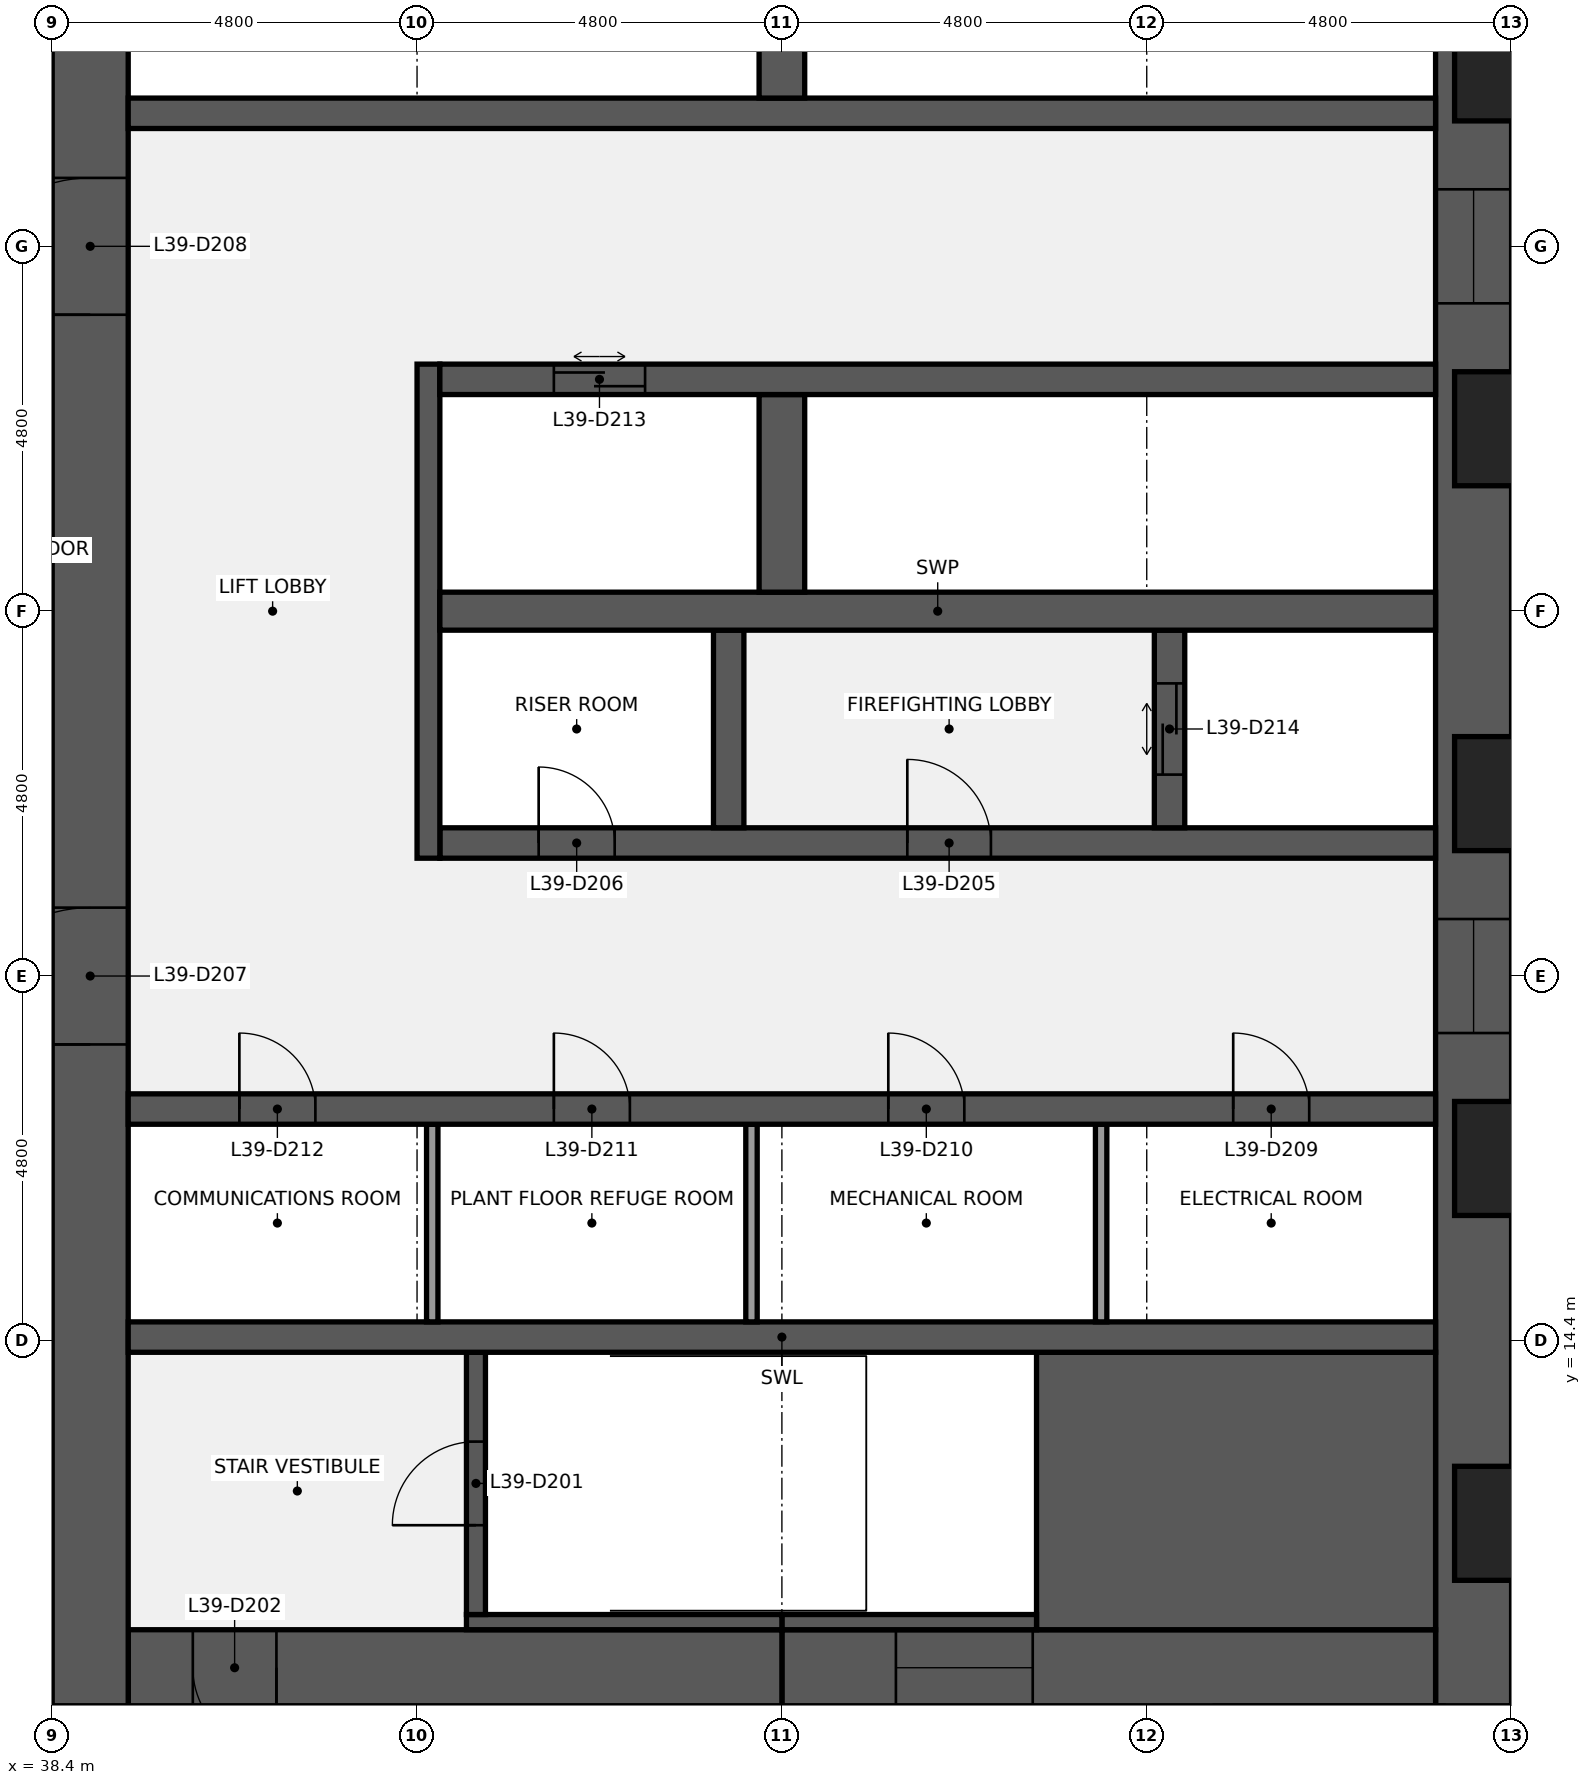
"""IFC4 building model, lengths in metres.
Left out: names, types, materials, properties, quantities, classifications, styles, units other than length and angle.
Written with IfcOpenShell. Run it as: python <this file> out.ifc"""

import sys

from ifc_helpers import new_model, si_unit, direction, frame, frame_2d, origin, place, context, subcontext, project, spatial, rectangle, extrude, element, fill, save


model = new_model("IFC4")
c1 = context("Model", 3, precision=1e-05, world=origin(), true_north=direction((0.0, 1.0)))
c2 = subcontext(c1, "Body", "Model", "MODEL_VIEW")
j1 = project(units=[si_unit("LENGTHUNIT", "METRE"), si_unit("PLANEANGLEUNIT", "RADIAN")], contexts=[c1])
p1 = place(None, origin())
s1 = spatial("IfcSite", under=j1, at=p1, CompositionType="ELEMENT")
p2 = place(p1, origin())
s2 = spatial("IfcBuilding", under=s1, at=p2, CompositionType="ELEMENT")
p3 = place(p2, frame((0.0, 0.0, 176.1)))
s3 = spatial("IfcBuildingStorey", under=s2, at=p3, CompositionType="ELEMENT", Elevation=176.1)
p4 = place(p3, frame((57.1, 38.4, 0.0), z_axis=(0.0, 0.0, 1.0), x_axis=(0.0, -1.0, 0.0)))
e1 = element("IfcWall", 1, at=p4, inside=s3, PredefinedType="SHEAR", context=c2, shape_type="SweptSolid", body=[
    extrude(rectangle(XDim=28.8, YDim=1.0, at=frame_2d((14.4, 0.0))), origin(), (0.0, 0.0, 1.0), 4.1),
])
p5 = place(p4, frame((18.45, 0.0, 0.9)))
e2 = element("IfcOpeningElement", 2, at=p5, cuts=e1, PredefinedType="OPENING", context=c2, shape_type="SweptSolid", body=[
    extrude(rectangle(XDim=1.5, YDim=1.5, at=frame_2d((0.75, 0.75))), frame((0.0, 0.51, 0.0), z_axis=(0.0, -1.0, 0.0), x_axis=(1.0, 0.0, 0.0)), (0.0, 0.0, 1.0), 1.02),
])
p6 = place(p4, frame((8.85, 0.0, 0.9)))
e3 = element("IfcOpeningElement", 3, at=p6, cuts=e1, PredefinedType="OPENING", context=c2, shape_type="SweptSolid", body=[
    extrude(rectangle(XDim=1.5, YDim=1.5, at=frame_2d((0.75, 0.75))), frame((0.0, 0.51, 0.0), z_axis=(0.0, -1.0, 0.0), x_axis=(1.0, 0.0, 0.0)), (0.0, 0.0, 1.0), 1.02),
])
p7 = place(p3, frame((56.6, 10.1, 0.0), z_axis=(0.0, 0.0, 1.0), x_axis=(-1.0, 0.0, 0.0)))
e4 = element("IfcWall", 4, at=p7, inside=s3, PredefinedType="SHEAR", context=c2, shape_type="SweptSolid", body=[
    extrude(rectangle(XDim=8.6, YDim=1.0, at=frame_2d((4.3, 0.0))), origin(), (0.0, 0.0, 1.0), 4.1),
])
p8 = place(p7, frame((5.3, 0.0, 0.9)))
e5 = element("IfcOpeningElement", 5, at=p8, cuts=e4, PredefinedType="OPENING", context=c2, shape_type="SweptSolid", body=[
    extrude(rectangle(XDim=1.8, YDim=1.5, at=frame_2d((0.9, 0.75))), frame((0.0, 0.51, 0.0), z_axis=(0.0, -1.0, 0.0), x_axis=(1.0, 0.0, 0.0)), (0.0, 0.0, 1.0), 1.02),
])
p9 = place(p3, frame((48.0, 10.1, 0.0), z_axis=(0.0, 0.0, 1.0), x_axis=(-1.0, 0.0, 0.0)))
e6 = element("IfcWall", 6, at=p9, inside=s3, PredefinedType="SHEAR", context=c2, shape_type="SweptSolid", body=[
    extrude(rectangle(XDim=8.6, YDim=1.0, at=frame_2d((4.3, 0.0))), origin(), (0.0, 0.0, 1.0), 4.1),
])
p10 = place(p9, frame((6.65, 0.0, 0.0)))
e7 = element("IfcOpeningElement", 7, at=p10, cuts=e6, PredefinedType="OPENING", context=c2, shape_type="SweptSolid", body=[
    extrude(rectangle(XDim=1.1, YDim=2.1, at=frame_2d((0.55, 1.05))), frame((0.0, 0.51, 0.0), z_axis=(0.0, -1.0, 0.0), x_axis=(1.0, 0.0, 0.0)), (0.0, 0.0, 1.0), 1.02),
])
p11 = place(p3, frame((38.9, 9.6, 0.0), z_axis=(0.0, 0.0, 1.0), x_axis=(0.0, 1.0, 0.0)))
e8 = element("IfcWall", 8, at=p11, inside=s3, PredefinedType="SHEAR", context=c2, shape_type="SweptSolid", body=[
    extrude(rectangle(XDim=28.8, YDim=1.0, at=frame_2d((14.4, 0.0))), origin(), (0.0, 0.0, 1.0), 4.1),
])
p12 = place(p11, frame((8.7, 0.0, 0.0)))
e9 = element("IfcOpeningElement", 9, at=p12, cuts=e8, PredefinedType="OPENING", context=c2, shape_type="SweptSolid", body=[
    extrude(rectangle(XDim=1.8, YDim=2.1, at=frame_2d((0.9, 1.05))), frame((0.0, 0.51, 0.0), z_axis=(0.0, -1.0, 0.0), x_axis=(1.0, 0.0, 0.0)), (0.0, 0.0, 1.0), 1.02),
])
p13 = place(p11, frame((18.3, 0.0, 0.0)))
e10 = element("IfcOpeningElement", 10, at=p13, cuts=e8, PredefinedType="OPENING", context=c2, shape_type="SweptSolid", body=[
    extrude(rectangle(XDim=1.8, YDim=2.1, at=frame_2d((0.9, 1.05))), frame((0.0, 0.51, 0.0), z_axis=(0.0, -1.0, 0.0), x_axis=(1.0, 0.0, 0.0)), (0.0, 0.0, 1.0), 1.02),
])
p14 = place(p3, frame((51.35, 12.425, 0.0), z_axis=(0.0, 0.0, 1.0), x_axis=(1.0, 0.0, 0.0)))
e11 = element("IfcWall", 11, at=p14, inside=s3, PredefinedType="SHEAR", context=c2, shape_type="SweptSolid", body=[
    extrude(rectangle(XDim=5.25, YDim=3.65, at=frame_2d((2.625, 0.0))), origin(), (0.0, 0.0, 1.0), 4.1),
])
p15 = place(p3, frame((48.0, 10.7, 0.0), z_axis=(0.0, 0.0, 1.0), x_axis=(1.0, 0.0, 0.0)))
e12 = element("IfcWall", 12, at=p15, inside=s3, PredefinedType="SHEAR", context=c2, shape_type="SweptSolid", body=[
    extrude(rectangle(XDim=3.35, YDim=0.2, at=frame_2d((1.675, 0.0))), origin(), (0.0, 0.0, 1.0), 4.1),
])
p16 = place(p3, frame((43.85, 10.7, 0.0), z_axis=(0.0, 0.0, 1.0), x_axis=(1.0, 0.0, 0.0)))
e13 = element("IfcWall", 13, at=p16, inside=s3, PredefinedType="SHEAR", context=c2, shape_type="SweptSolid", body=[
    extrude(rectangle(XDim=4.15, YDim=0.2, at=frame_2d((2.075, 0.0))), origin(), (0.0, 0.0, 1.0), 4.1),
])
p17 = place(p3, frame((43.975, 10.8, 0.0), z_axis=(0.0, 0.0, 1.0), x_axis=(0.0, 1.0, 0.0)))
e14 = element("IfcWall", 14, at=p17, inside=s3, PredefinedType="SHEAR", context=c2, shape_type="SweptSolid", body=[
    extrude(rectangle(XDim=3.45, YDim=0.25, at=frame_2d((1.725, 0.0))), origin(), (0.0, 0.0, 1.0), 4.1),
])
p18 = place(p17, frame((1.175, 0.0, 0.0)))
e15 = element("IfcOpeningElement", 15, at=p18, cuts=e14, PredefinedType="OPENING", context=c2, shape_type="SweptSolid", body=[
    extrude(rectangle(XDim=1.1, YDim=2.1, at=frame_2d((0.55, 1.05))), frame((0.0, 0.135, 0.0), z_axis=(0.0, -1.0, 0.0), x_axis=(1.0, 0.0, 0.0)), (0.0, 0.0, 1.0), 0.27),
])
p19 = place(p3, frame((39.4, 14.45, 0.0), z_axis=(0.0, 0.0, 1.0), x_axis=(1.0, 0.0, 0.0)))
e16 = element("IfcWall", 16, at=p19, inside=s3, PredefinedType="SHEAR", context=c2, shape_type="SweptSolid", body=[
    extrude(rectangle(XDim=17.2, YDim=0.4, at=frame_2d((8.6, 0.0))), origin(), (0.0, 0.0, 1.0), 4.1),
])
for number, where, z_axis, x_axis in (
    (17, (52.2, 14.65, 0.0), (0.0, 0.0, 1.0), (0.0, 1.0, 0.0)),
    (18, (47.6, 14.65, 0.0), (0.0, 0.0, 1.0), (0.0, 1.0, 0.0)),
    (19, (43.4, 14.65, 0.0), (0.0, 0.0, 1.0), (0.0, 1.0, 0.0)),
):
    element("IfcWall", number, at=place(p3, frame(where, z_axis=z_axis, x_axis=x_axis)), inside=s3, PredefinedType="PARTITIONING", context=c2, shape_type="SweptSolid", body=[
        extrude(rectangle(XDim=2.6, YDim=0.15, at=frame_2d((1.3, 0.0))), origin(), (0.0, 0.0, 1.0), 4.1),
    ])
p20 = place(p3, frame((39.4, 17.45, 0.0), z_axis=(0.0, 0.0, 1.0), x_axis=(1.0, 0.0, 0.0)))
e20 = element("IfcWall", 20, at=p20, inside=s3, PredefinedType="SHEAR", context=c2, shape_type="SweptSolid", body=[
    extrude(rectangle(XDim=17.2, YDim=0.4, at=frame_2d((8.6, 0.0))), origin(), (0.0, 0.0, 1.0), 4.1),
])
p21 = place(p20, frame((14.538, 0.0, 0.0)))
e21 = element("IfcOpeningElement", 21, at=p21, cuts=e20, PredefinedType="OPENING", context=c2, shape_type="SweptSolid", body=[
    extrude(rectangle(XDim=1.0, YDim=2.1, at=frame_2d((0.5, 1.05))), frame((0.0, 0.21, 0.0), z_axis=(0.0, -1.0, 0.0), x_axis=(1.0, 0.0, 0.0)), (0.0, 0.0, 1.0), 0.42),
])
p22 = place(p20, frame((10.0, 0.0, 0.0)))
e22 = element("IfcOpeningElement", 22, at=p22, cuts=e20, PredefinedType="OPENING", context=c2, shape_type="SweptSolid", body=[
    extrude(rectangle(XDim=1.0, YDim=2.1, at=frame_2d((0.5, 1.05))), frame((0.0, 0.21, 0.0), z_axis=(0.0, -1.0, 0.0), x_axis=(1.0, 0.0, 0.0)), (0.0, 0.0, 1.0), 0.42),
])
p23 = place(p20, frame((5.6, 0.0, 0.0)))
e23 = element("IfcOpeningElement", 23, at=p23, cuts=e20, PredefinedType="OPENING", context=c2, shape_type="SweptSolid", body=[
    extrude(rectangle(XDim=1.0, YDim=2.1, at=frame_2d((0.5, 1.05))), frame((0.0, 0.21, 0.0), z_axis=(0.0, -1.0, 0.0), x_axis=(1.0, 0.0, 0.0)), (0.0, 0.0, 1.0), 0.42),
])
p24 = place(p20, frame((1.462, 0.0, 0.0)))
e24 = element("IfcOpeningElement", 24, at=p24, cuts=e20, PredefinedType="OPENING", context=c2, shape_type="SweptSolid", body=[
    extrude(rectangle(XDim=1.0, YDim=2.1, at=frame_2d((0.5, 1.05))), frame((0.0, 0.21, 0.0), z_axis=(0.0, -1.0, 0.0), x_axis=(1.0, 0.0, 0.0)), (0.0, 0.0, 1.0), 0.42),
])
p25 = place(p3, frame((43.5, 20.95, 0.0), z_axis=(0.0, 0.0, 1.0), x_axis=(1.0, 0.0, 0.0)))
e25 = element("IfcWall", 25, at=p25, inside=s3, PredefinedType="SHEAR", context=c2, shape_type="SweptSolid", body=[
    extrude(rectangle(XDim=13.1, YDim=0.4, at=frame_2d((6.55, 0.0))), origin(), (0.0, 0.0, 1.0), 4.1),
])
p26 = place(p25, frame((6.15, 0.0, 0.0)))
e26 = element("IfcOpeningElement", 26, at=p26, cuts=e25, PredefinedType="OPENING", context=c2, shape_type="SweptSolid", body=[
    extrude(rectangle(XDim=1.1, YDim=2.1, at=frame_2d((0.55, 1.05))), frame((0.0, 0.21, 0.0), z_axis=(0.0, -1.0, 0.0), x_axis=(1.0, 0.0, 0.0)), (0.0, 0.0, 1.0), 0.42),
])
p27 = place(p25, frame((1.3, 0.0, 0.0)))
e27 = element("IfcOpeningElement", 27, at=p27, cuts=e25, PredefinedType="OPENING", context=c2, shape_type="SweptSolid", body=[
    extrude(rectangle(XDim=1.0, YDim=2.1, at=frame_2d((0.5, 1.05))), frame((0.0, 0.21, 0.0), z_axis=(0.0, -1.0, 0.0), x_axis=(1.0, 0.0, 0.0)), (0.0, 0.0, 1.0), 0.42),
])
p28 = place(p3, frame((43.35, 20.75, 0.0), z_axis=(0.0, 0.0, 1.0), x_axis=(0.0, 1.0, 0.0)))
e28 = element("IfcWall", 28, at=p28, inside=s3, PredefinedType="SHEAR", context=c2, shape_type="SweptSolid", body=[
    extrude(rectangle(XDim=6.5, YDim=0.3, at=frame_2d((3.25, 0.0))), origin(), (0.0, 0.0, 1.0), 4.1),
])
p29 = place(p3, frame((53.1, 21.15, 0.0), z_axis=(0.0, 0.0, 1.0), x_axis=(0.0, 1.0, 0.0)))
e29 = element("IfcWall", 29, at=p29, inside=s3, PredefinedType="SHEAR", context=c2, shape_type="SweptSolid", body=[
    extrude(rectangle(XDim=2.6, YDim=0.4, at=frame_2d((1.3, 0.0))), origin(), (0.0, 0.0, 1.0), 4.1),
])
p30 = place(p29, frame((0.7, 0.0, 0.0)))
e30 = element("IfcOpeningElement", 30, at=p30, cuts=e29, PredefinedType="OPENING", context=c2, shape_type="SweptSolid", body=[
    extrude(rectangle(XDim=1.2, YDim=2.1, at=frame_2d((0.6, 1.05))), frame((0.0, 0.21, 0.0), z_axis=(0.0, -1.0, 0.0), x_axis=(1.0, 0.0, 0.0)), (0.0, 0.0, 1.0), 0.42),
])
p31 = place(p3, frame((47.3, 21.15, 0.0), z_axis=(0.0, 0.0, 1.0), x_axis=(0.0, 1.0, 0.0)))
e31 = element("IfcWall", 31, at=p31, inside=s3, PredefinedType="SHEAR", context=c2, shape_type="SweptSolid", body=[
    extrude(rectangle(XDim=2.6, YDim=0.4, at=frame_2d((1.3, 0.0))), origin(), (0.0, 0.0, 1.0), 4.1),
])
p32 = place(p3, frame((43.5, 24.0, 0.0), z_axis=(0.0, 0.0, 1.0), x_axis=(1.0, 0.0, 0.0)))
e32 = element("IfcWall", 32, at=p32, inside=s3, PredefinedType="SHEAR", context=c2, shape_type="SweptSolid", body=[
    extrude(rectangle(XDim=13.1, YDim=0.5, at=frame_2d((6.55, 0.0))), origin(), (0.0, 0.0, 1.0), 4.1),
])
p33 = place(p3, frame((48.0, 24.25, 0.0), z_axis=(0.0, 0.0, 1.0), x_axis=(0.0, 1.0, 0.0)))
e33 = element("IfcWall", 33, at=p33, inside=s3, PredefinedType="SHEAR", context=c2, shape_type="SweptSolid", body=[
    extrude(rectangle(XDim=2.6, YDim=0.6, at=frame_2d((1.3, 0.0))), origin(), (0.0, 0.0, 1.0), 4.1),
])
p34 = place(p3, frame((43.5, 27.05, 0.0), z_axis=(0.0, 0.0, 1.0), x_axis=(1.0, 0.0, 0.0)))
e34 = element("IfcWall", 34, at=p34, inside=s3, PredefinedType="SHEAR", context=c2, shape_type="SweptSolid", body=[
    extrude(rectangle(XDim=13.1, YDim=0.4, at=frame_2d((6.55, 0.0))), origin(), (0.0, 0.0, 1.0), 4.1),
])
p35 = place(p34, frame((1.5, 0.0, 0.0)))
e35 = element("IfcOpeningElement", 35, at=p35, cuts=e34, PredefinedType="OPENING", context=c2, shape_type="SweptSolid", body=[
    extrude(rectangle(XDim=1.2, YDim=2.1, at=frame_2d((0.6, 1.05))), frame((0.0, 0.21, 0.0), z_axis=(0.0, -1.0, 0.0), x_axis=(1.0, 0.0, 0.0)), (0.0, 0.0, 1.0), 0.42),
])
p36 = place(p3, frame((39.4, 30.55, 0.0), z_axis=(0.0, 0.0, 1.0), x_axis=(1.0, 0.0, 0.0)))
e36 = element("IfcWall", 36, at=p36, inside=s3, PredefinedType="SHEAR", context=c2, shape_type="SweptSolid", body=[
    extrude(rectangle(XDim=17.2, YDim=0.4, at=frame_2d((8.6, 0.0))), origin(), (0.0, 0.0, 1.0), 4.1),
])
p37 = place(p3, frame((48.0, 30.75, 0.0), z_axis=(0.0, 0.0, 1.0), x_axis=(0.0, 1.0, 0.0)))
e37 = element("IfcWall", 37, at=p37, inside=s3, PredefinedType="SHEAR", context=c2, shape_type="SweptSolid", body=[
    extrude(rectangle(XDim=2.6, YDim=0.6, at=frame_2d((1.3, 0.0))), origin(), (0.0, 0.0, 1.0), 4.1),
])
p38 = place(p18, origin())
e38 = element("IfcDoor", 38, at=p38, inside=s3, OperationType="SINGLE_SWING_LEFT", PredefinedType="DOOR", context=c2, shape_type="SweptSolid", body=[
    extrude(rectangle(XDim=1.1, YDim=2.1, at=frame_2d((0.55, 1.05))), frame((0.0, 0.025, 0.0), z_axis=(0.0, -1.0, 0.0), x_axis=(1.0, 0.0, 0.0)), (0.0, 0.0, 1.0), 0.05),
])
fill(e15, e38)
p39 = place(p10, origin())
e39 = element("IfcDoor", 39, at=p39, inside=s3, OperationType="SINGLE_SWING_LEFT", PredefinedType="DOOR", context=c2, shape_type="SweptSolid", body=[
    extrude(rectangle(XDim=1.1, YDim=2.1, at=frame_2d((0.55, 1.05))), frame((0.0, 0.025, 0.0), z_axis=(0.0, -1.0, 0.0), x_axis=(1.0, 0.0, 0.0)), (0.0, 0.0, 1.0), 0.05),
])
fill(e7, e39)
p40 = place(p26, origin())
e40 = element("IfcDoor", 40, at=p40, inside=s3, OperationType="SINGLE_SWING_LEFT", PredefinedType="DOOR", context=c2, shape_type="SweptSolid", body=[
    extrude(rectangle(XDim=1.1, YDim=2.1, at=frame_2d((0.55, 1.05))), frame((0.0, 0.025, 0.0), z_axis=(0.0, -1.0, 0.0), x_axis=(1.0, 0.0, 0.0)), (0.0, 0.0, 1.0), 0.05),
])
fill(e26, e40)
p41 = place(p27, origin())
e41 = element("IfcDoor", 41, at=p41, inside=s3, OperationType="SINGLE_SWING_LEFT", PredefinedType="DOOR", context=c2, shape_type="SweptSolid", body=[
    extrude(rectangle(XDim=1.0, YDim=2.1, at=frame_2d((0.5, 1.05))), frame((0.0, 0.025, 0.0), z_axis=(0.0, -1.0, 0.0), x_axis=(1.0, 0.0, 0.0)), (0.0, 0.0, 1.0), 0.05),
])
fill(e27, e41)
p42 = place(p12, origin())
e42 = element("IfcDoor", 42, at=p42, inside=s3, OperationType="DOUBLE_DOOR_SINGLE_SWING", PredefinedType="DOOR", context=c2, shape_type="SweptSolid", body=[
    extrude(rectangle(XDim=1.8, YDim=2.1, at=frame_2d((0.9, 1.05))), frame((0.0, 0.025, 0.0), z_axis=(0.0, -1.0, 0.0), x_axis=(1.0, 0.0, 0.0)), (0.0, 0.0, 1.0), 0.05),
])
fill(e9, e42)
p43 = place(p13, origin())
e43 = element("IfcDoor", 43, at=p43, inside=s3, OperationType="DOUBLE_DOOR_SINGLE_SWING", PredefinedType="DOOR", context=c2, shape_type="SweptSolid", body=[
    extrude(rectangle(XDim=1.8, YDim=2.1, at=frame_2d((0.9, 1.05))), frame((0.0, 0.025, 0.0), z_axis=(0.0, -1.0, 0.0), x_axis=(1.0, 0.0, 0.0)), (0.0, 0.0, 1.0), 0.05),
])
fill(e10, e43)
p44 = place(p21, origin())
e44 = element("IfcDoor", 44, at=p44, inside=s3, OperationType="SINGLE_SWING_LEFT", PredefinedType="DOOR", context=c2, shape_type="SweptSolid", body=[
    extrude(rectangle(XDim=1.0, YDim=2.1, at=frame_2d((0.5, 1.05))), frame((0.0, 0.025, 0.0), z_axis=(0.0, -1.0, 0.0), x_axis=(1.0, 0.0, 0.0)), (0.0, 0.0, 1.0), 0.05),
])
fill(e21, e44)
p45 = place(p22, origin())
e45 = element("IfcDoor", 45, at=p45, inside=s3, OperationType="SINGLE_SWING_LEFT", PredefinedType="DOOR", context=c2, shape_type="SweptSolid", body=[
    extrude(rectangle(XDim=1.0, YDim=2.1, at=frame_2d((0.5, 1.05))), frame((0.0, 0.025, 0.0), z_axis=(0.0, -1.0, 0.0), x_axis=(1.0, 0.0, 0.0)), (0.0, 0.0, 1.0), 0.05),
])
fill(e22, e45)
p46 = place(p23, origin())
e46 = element("IfcDoor", 46, at=p46, inside=s3, OperationType="SINGLE_SWING_LEFT", PredefinedType="DOOR", context=c2, shape_type="SweptSolid", body=[
    extrude(rectangle(XDim=1.0, YDim=2.1, at=frame_2d((0.5, 1.05))), frame((0.0, 0.025, 0.0), z_axis=(0.0, -1.0, 0.0), x_axis=(1.0, 0.0, 0.0)), (0.0, 0.0, 1.0), 0.05),
])
fill(e23, e46)
p47 = place(p24, origin())
e47 = element("IfcDoor", 47, at=p47, inside=s3, OperationType="SINGLE_SWING_LEFT", PredefinedType="DOOR", context=c2, shape_type="SweptSolid", body=[
    extrude(rectangle(XDim=1.0, YDim=2.1, at=frame_2d((0.5, 1.05))), frame((0.0, 0.025, 0.0), z_axis=(0.0, -1.0, 0.0), x_axis=(1.0, 0.0, 0.0)), (0.0, 0.0, 1.0), 0.05),
])
fill(e24, e47)
p48 = place(p35, origin())
e48 = element("IfcDoor", 48, at=p48, inside=s3, OperationType="DOUBLE_DOOR_SLIDING", PredefinedType="DOOR", context=c2, shape_type="SweptSolid", body=[
    extrude(rectangle(XDim=1.2, YDim=2.1, at=frame_2d((0.6, 1.05))), frame((0.0, 0.025, 0.0), z_axis=(0.0, -1.0, 0.0), x_axis=(1.0, 0.0, 0.0)), (0.0, 0.0, 1.0), 0.05),
])
fill(e35, e48)
p49 = place(p30, origin())
e49 = element("IfcDoor", 49, at=p49, inside=s3, OperationType="DOUBLE_DOOR_SLIDING", PredefinedType="DOOR", context=c2, shape_type="SweptSolid", body=[
    extrude(rectangle(XDim=1.2, YDim=2.1, at=frame_2d((0.6, 1.05))), frame((0.0, 0.025, 0.0), z_axis=(0.0, -1.0, 0.0), x_axis=(1.0, 0.0, 0.0)), (0.0, 0.0, 1.0), 0.05),
])
fill(e30, e49)
p50 = place(p5, origin())
e50 = element("IfcWindow", 50, at=p50, inside=s3, PartitioningType="SINGLE_PANEL", PredefinedType="WINDOW", context=c2, shape_type="SweptSolid", body=[
    extrude(rectangle(XDim=1.5, YDim=1.5, at=frame_2d((0.75, 0.75))), frame((0.0, 0.03, 0.0), z_axis=(0.0, -1.0, 0.0), x_axis=(1.0, 0.0, 0.0)), (0.0, 0.0, 1.0), 0.06),
])
fill(e2, e50)
p51 = place(p6, origin())
e51 = element("IfcWindow", 51, at=p51, inside=s3, PartitioningType="SINGLE_PANEL", PredefinedType="WINDOW", context=c2, shape_type="SweptSolid", body=[
    extrude(rectangle(XDim=1.5, YDim=1.5, at=frame_2d((0.75, 0.75))), frame((0.0, 0.03, 0.0), z_axis=(0.0, -1.0, 0.0), x_axis=(1.0, 0.0, 0.0)), (0.0, 0.0, 1.0), 0.06),
])
fill(e3, e51)
p52 = place(p8, origin())
e52 = element("IfcWindow", 52, at=p52, inside=s3, PartitioningType="SINGLE_PANEL", PredefinedType="WINDOW", context=c2, shape_type="SweptSolid", body=[
    extrude(rectangle(XDim=1.8, YDim=1.5, at=frame_2d((0.9, 0.75))), frame((0.0, 0.03, 0.0), z_axis=(0.0, -1.0, 0.0), x_axis=(1.0, 0.0, 0.0)), (0.0, 0.0, 1.0), 0.06),
])
fill(e5, e52)
save(model, sys.argv[1])
